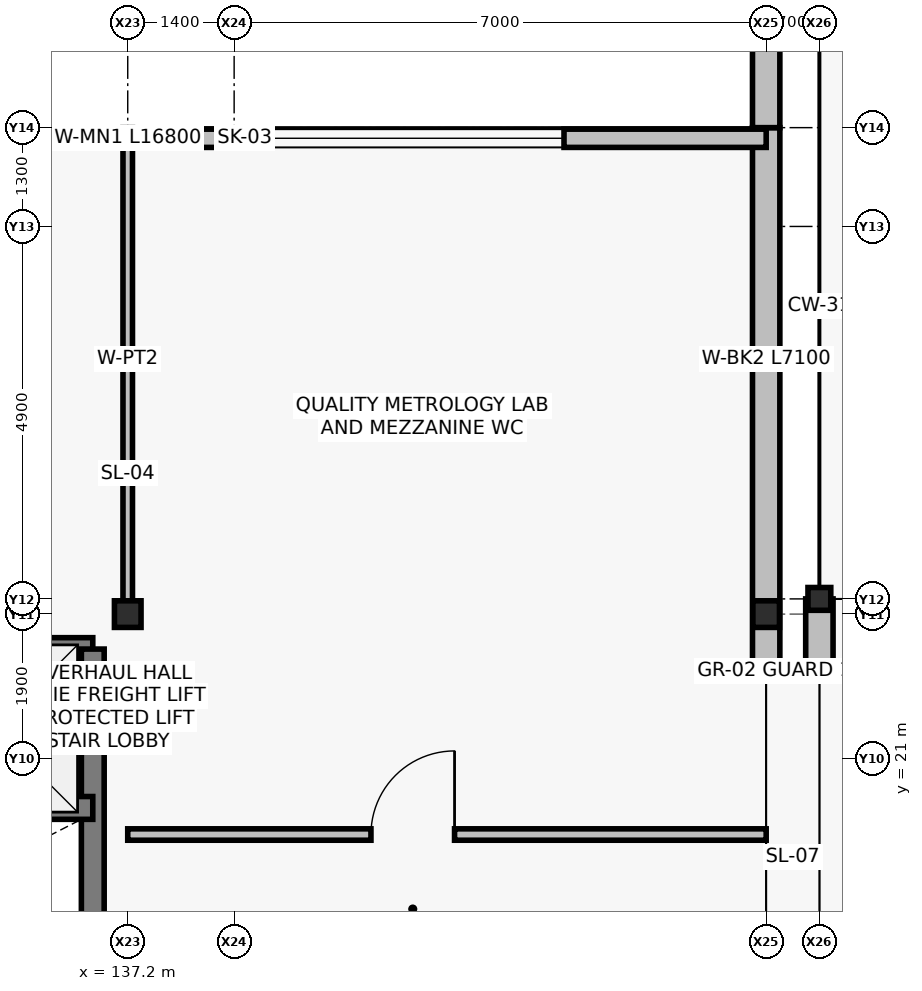
"""IFC4 building model, lengths in metres.
Left out: names, types, materials, properties, quantities, classifications, styles, units other than length and angle.
Written with IfcOpenShell. Run it as: python <this file> out.ifc"""

import sys

from ifc_helpers import new_model, si_unit, direction, frame, frame_2d, origin, origin_2d, place, context, subcontext, project, spatial, rectangle, i_section, extrude, element, fill, save


model = new_model("IFC4")
c1 = context("Model", 3, precision=1e-05, world=origin(), true_north=direction((0.0, 1.0)))
c2 = subcontext(c1, "Body", "Model", "MODEL_VIEW")
j1 = project(units=[si_unit("LENGTHUNIT", "METRE"), si_unit("PLANEANGLEUNIT", "RADIAN")], contexts=[c1])
p1 = place(None, origin())
s1 = spatial("IfcSite", under=j1, at=p1, CompositionType="ELEMENT")
p2 = place(p1, origin())
s2 = spatial("IfcBuilding", under=s1, at=p2, CompositionType="ELEMENT")
p3 = place(p2, frame((0.0, 0.0, 6.0)))
s3 = spatial("IfcBuildingStorey", under=s2, at=p3, CompositionType="ELEMENT", Elevation=6.0)
for number, where, z_axis, x_axis in (
    (1, (137.2, 22.9, 0.0), (0.0, 0.0, 1.0), (1.0, 0.0, 0.0)),
    (2, (145.6, 22.9, 0.0), (0.0, 0.0, 1.0), (1.0, 0.0, 0.0)),
):
    element("IfcColumn", number, at=place(p3, frame(where, z_axis=z_axis, x_axis=x_axis)), inside=s3, PredefinedType="COLUMN", context=c2, shape_type="SweptSolid", body=[
        extrude(i_section(OverallWidth=0.35, OverallDepth=0.35, WebThickness=0.012, FlangeThickness=0.019, at=origin_2d()), origin(), (0.0, 0.0, 1.0), 5.1),
    ])
p4 = place(p3, frame((146.3, 23.1, 0.0), z_axis=(0.0, 0.0, 1.0), x_axis=(1.0, 0.0, 0.0)))
e3 = element("IfcColumn", 3, at=p4, inside=s3, PredefinedType="COLUMN", context=c2, shape_type="SweptSolid", body=[
    extrude(i_section(OverallWidth=0.3, OverallDepth=0.3, WebThickness=0.01, FlangeThickness=0.015, at=origin_2d()), origin(), (0.0, 0.0, 1.0), 5.1),
])
p5 = place(p3, frame((145.6, 22.2, 0.0), z_axis=(0.0, 0.0, 1.0), x_axis=(0.0, 1.0, 0.0)))
e4 = element("IfcWall", 4, at=p5, inside=s3, PredefinedType="SOLIDWALL", context=c2, shape_type="SweptSolid", body=[
    extrude(rectangle(XDim=7.1, YDim=0.36, at=frame_2d((3.55, 0.0))), origin(), (0.0, 0.0, 1.0), 2.58),
])
p6 = place(p3, frame((145.6, 29.3, -0.02), z_axis=(0.0, 0.0, 1.0), x_axis=(0.0, 1.0, 0.0)))
e5 = element("IfcWall", 5, at=p6, inside=s3, PredefinedType="SOLIDWALL", context=c2, shape_type="SweptSolid", body=[
    extrude(rectangle(XDim=25.6, YDim=0.36, at=frame_2d((12.8, 0.0))), origin(), (0.0, 0.0, 1.0), 2.6),
])
p7 = place(p3, frame((128.8, 29.16, 9.3), z_axis=(0.0, 0.0, 1.0), x_axis=(1.0, 0.0, 0.0)))
e6 = element("IfcWall", 6, at=p7, inside=s3, PredefinedType="SOLIDWALL", context=c2, shape_type="SweptSolid", body=[
    extrude(rectangle(XDim=16.8, YDim=0.24, at=frame_2d((8.4, 0.0))), origin(), (0.0, 0.0, 1.0), 2.75),
])
p8 = place(p7, frame((2.64, 0.0, 0.45)))
e7 = element("IfcOpeningElement", 7, at=p8, cuts=e6, PredefinedType="OPENING", context=c2, shape_type="SweptSolid", body=[
    extrude(rectangle(XDim=4.2, YDim=1.5, at=frame_2d((2.1, 0.75))), frame((0.0, 0.13, 0.0), z_axis=(0.0, -1.0, 0.0), x_axis=(1.0, 0.0, 0.0)), (0.0, 0.0, 1.0), 0.26),
])
p9 = place(p7, frame((9.94, 0.0, 0.45)))
e8 = element("IfcOpeningElement", 8, at=p9, cuts=e6, PredefinedType="OPENING", context=c2, shape_type="SweptSolid", body=[
    extrude(rectangle(XDim=4.2, YDim=1.5, at=frame_2d((2.1, 0.75))), frame((0.0, 0.13, 0.0), z_axis=(0.0, -1.0, 0.0), x_axis=(1.0, 0.0, 0.0)), (0.0, 0.0, 1.0), 0.26),
])
p10 = place(p3, frame((146.3, 22.2, 0.0), z_axis=(0.0, 0.0, 1.0), x_axis=(0.0, 1.0, 0.0)))
e9 = element("IfcWall", 9, at=p10, inside=s3, PredefinedType="SOLIDWALL", context=c2, shape_type="SweptSolid", body=[
    extrude(rectangle(XDim=0.9, YDim=0.36, at=frame_2d((0.45, 0.0))), origin(), (0.0, 0.0, 1.0), 2.9),
])
p11 = place(p3, frame((129.26, 22.44, 0.0), z_axis=(0.0, 0.0, 1.0), x_axis=(1.0, 0.0, 0.0)))
e10 = element("IfcWall", 10, at=p11, inside=s3, PredefinedType="SHEAR", context=c2, shape_type="SweptSolid", body=[
    extrude(rectangle(XDim=7.48, YDim=0.3, at=frame_2d((3.74, 0.0))), origin(), (0.0, 0.0, 1.0), 4.82),
])
p12 = place(p11, frame((0.55, 0.0, 0.0)))
e11 = element("IfcOpeningElement", 11, at=p12, cuts=e10, PredefinedType="OPENING", context=c2, shape_type="SweptSolid", body=[
    extrude(rectangle(XDim=1.5, YDim=2.2, at=frame_2d((0.75, 1.1))), frame((0.0, 0.16, 0.0), z_axis=(0.0, -1.0, 0.0), x_axis=(1.0, 0.0, 0.0)), (0.0, 0.0, 1.0), 0.32),
])
p13 = place(p3, frame((136.74, 16.96, 0.0), z_axis=(0.0, 0.0, 1.0), x_axis=(0.0, 1.0, 0.0)))
e12 = element("IfcWall", 12, at=p13, inside=s3, PredefinedType="SHEAR", context=c2, shape_type="SweptSolid", body=[
    extrude(rectangle(XDim=5.48, YDim=0.3, at=frame_2d((2.74, 0.0))), origin(), (0.0, 0.0, 1.0), 4.82),
])
p14 = place(p3, frame((129.26, 20.35, 0.0), z_axis=(0.0, 0.0, 1.0), x_axis=(1.0, 0.0, 0.0)))
e13 = element("IfcWall", 13, at=p14, inside=s3, PredefinedType="SHEAR", context=c2, shape_type="SweptSolid", body=[
    extrude(rectangle(XDim=7.48, YDim=0.3, at=frame_2d((3.74, 0.0))), origin(), (0.0, 0.0, 1.0), 4.82),
])
p15 = place(p14, frame((0.185, 0.0, 0.0)))
e14 = element("IfcOpeningElement", 14, at=p15, cuts=e13, PredefinedType="OPENING", context=c2, shape_type="SweptSolid", body=[
    extrude(rectangle(XDim=1.05, YDim=2.15, at=frame_2d((0.525, 1.075))), frame((0.0, 0.16, 0.0), z_axis=(0.0, -1.0, 0.0), x_axis=(1.0, 0.0, 0.0)), (0.0, 0.0, 1.0), 0.32),
])
p16 = place(p3, frame((137.2, 22.9, 0.0), z_axis=(0.0, 0.0, 1.0), x_axis=(0.0, 1.0, 0.0)))
e15 = element("IfcWall", 15, at=p16, inside=s3, PredefinedType="PARTITIONING", context=c2, shape_type="SweptSolid", body=[
    extrude(rectangle(XDim=6.4, YDim=0.125, at=frame_2d((3.2, 0.0))), origin(), (0.0, 0.0, 1.0), 4.05),
])
p17 = place(p3, frame((137.2, 20.0, 0.0), z_axis=(0.0, 0.0, 1.0), x_axis=(1.0, 0.0, 0.0)))
e16 = element("IfcWall", 16, at=p17, inside=s3, PredefinedType="PARTITIONING", context=c2, shape_type="SweptSolid", body=[
    extrude(rectangle(XDim=8.4, YDim=0.15, at=frame_2d((4.2, 0.0))), origin(), (0.0, 0.0, 1.0), 4.05),
])
p18 = place(p17, frame((3.2, 0.0, 0.0)))
e17 = element("IfcOpeningElement", 17, at=p18, cuts=e16, PredefinedType="OPENING", context=c2, shape_type="SweptSolid", body=[
    extrude(rectangle(XDim=1.1, YDim=2.1, at=frame_2d((0.55, 1.05))), frame((0.0, 0.085, 0.0), z_axis=(0.0, -1.0, 0.0), x_axis=(1.0, 0.0, 0.0)), (0.0, 0.0, 1.0), 0.17),
])
p19 = place(p9, origin())
e18 = element("IfcWindow", 18, at=p19, inside=s3, PartitioningType="SINGLE_PANEL", PredefinedType="SKYLIGHT", context=c2, shape_type="SweptSolid", body=[
    extrude(rectangle(XDim=4.2, YDim=1.5, at=frame_2d((2.1, 0.75))), frame((0.0, 0.03, 0.0), z_axis=(0.0, -1.0, 0.0), x_axis=(1.0, 0.0, 0.0)), (0.0, 0.0, 1.0), 0.06),
])
fill(e8, e18)
p20 = place(p18, origin())
e19 = element("IfcDoor", 19, at=p20, inside=s3, OperationType="SINGLE_SWING_RIGHT", PredefinedType="DOOR", context=c2, shape_type="SweptSolid", body=[
    extrude(rectangle(XDim=1.1, YDim=2.1, at=frame_2d((0.55, 1.05))), frame((0.0, 0.025, 0.0), z_axis=(0.0, -1.0, 0.0), x_axis=(1.0, 0.0, 0.0)), (0.0, 0.0, 1.0), 0.05),
])
fill(e17, e19)
save(model, sys.argv[1])
